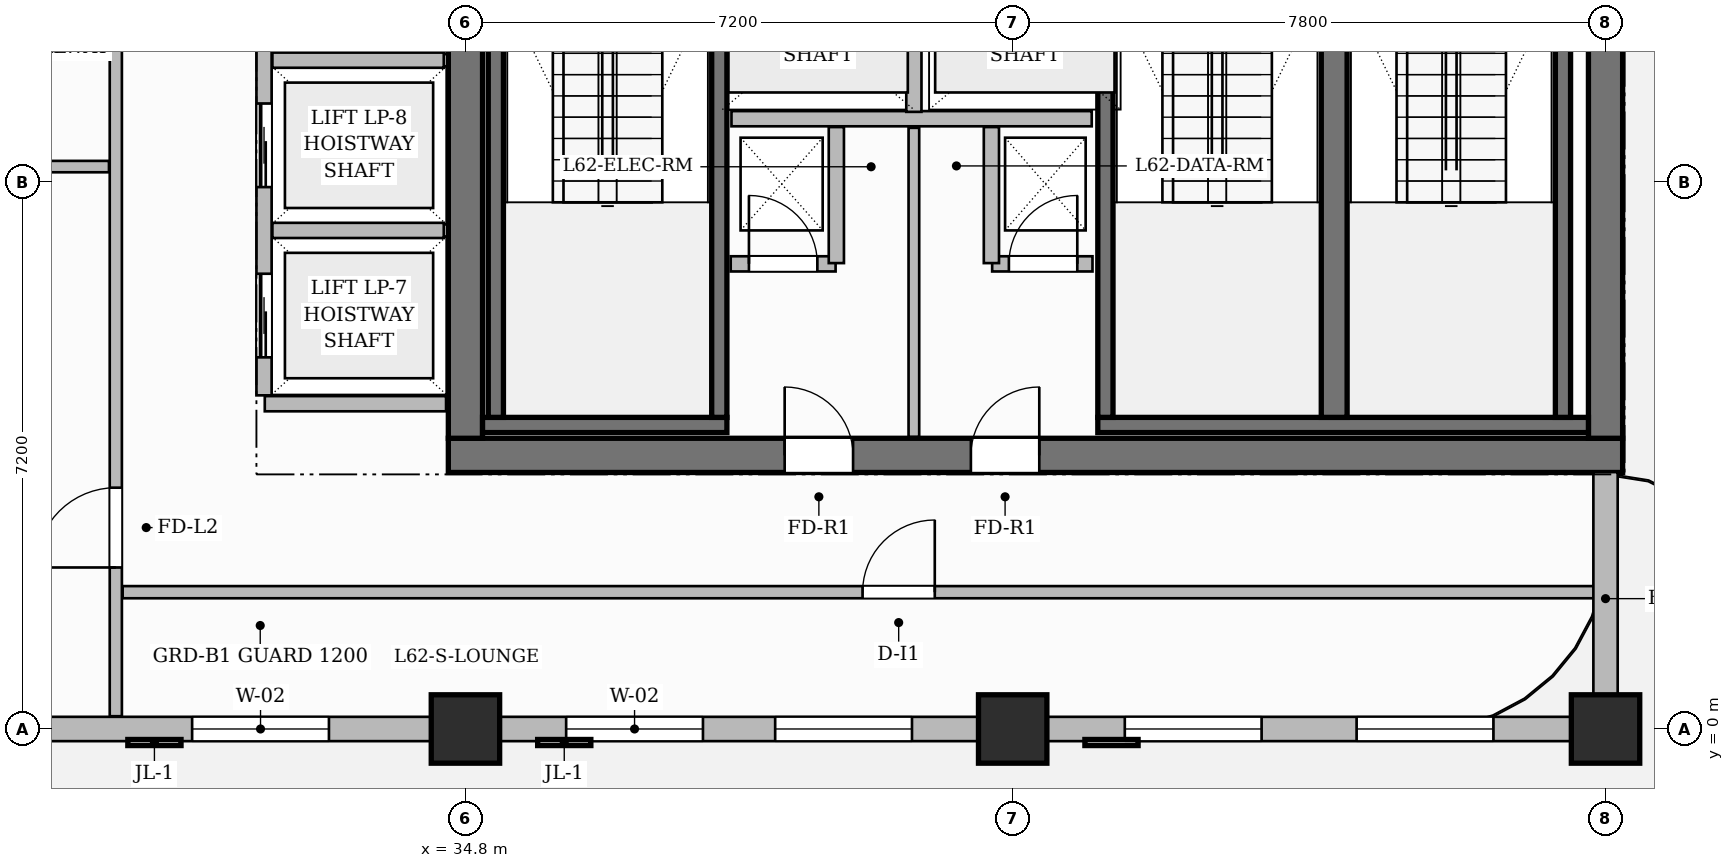
"""IFC4 building model, lengths in metres.
Left out: names, types, materials, properties, quantities, classifications, styles, units other than length and angle.
Written with IfcOpenShell. Run it as: python <this file> out.ifc"""

import sys

from ifc_helpers import new_model, si_unit, direction, frame, frame_2d, origin, origin_2d, place, context, subcontext, project, spatial, rectangle, extrude, source, transform, mapped, element, fill, save


model = new_model("IFC4")
c1 = context("Model", 3, precision=1e-05, world=origin(), true_north=direction((0.0, 1.0)))
c2 = subcontext(c1, "Body", "Model", "MODEL_VIEW")
j1 = project(units=[si_unit("LENGTHUNIT", "METRE"), si_unit("PLANEANGLEUNIT", "RADIAN")], contexts=[c1])
p1 = place(None, origin())
s1 = spatial("IfcSite", under=j1, at=p1, CompositionType="ELEMENT")
p2 = place(p1, origin())
s2 = spatial("IfcBuilding", under=s1, at=p2, CompositionType="ELEMENT")
p3 = place(p2, frame((0.0, 0.0, 248.1)))
s3 = spatial("IfcBuildingStorey", under=s2, at=p3, CompositionType="ELEMENT", Elevation=248.1)
p4 = place(p3, frame((34.575, 3.6, 0.0), z_axis=(0.0, 0.0, 1.0), x_axis=(1.0, 0.0, 0.0)))
e1 = element("IfcWall", 1, at=p4, inside=s3, PredefinedType="SHEAR", context=c2, shape_type="SweptSolid", body=[
    extrude(rectangle(XDim=15.45, YDim=0.45, at=frame_2d((7.725, 0.0))), origin(), (0.0, 0.0, 1.0), 3.85),
])
p5 = place(p4, frame((4.425, 0.0, 0.0)))
e2 = element("IfcOpeningElement", 2, at=p5, cuts=e1, PredefinedType="OPENING", context=c2, shape_type="SweptSolid", body=[
    extrude(rectangle(XDim=0.9, YDim=2.1, at=frame_2d((0.45, 1.05))), frame((0.0, 0.235, 0.0), z_axis=(0.0, -1.0, 0.0), x_axis=(1.0, 0.0, 0.0)), (0.0, 0.0, 1.0), 0.47),
])
p6 = place(p4, frame((6.875, 0.0, 0.0)))
e3 = element("IfcOpeningElement", 3, at=p6, cuts=e1, PredefinedType="OPENING", context=c2, shape_type="SweptSolid", body=[
    extrude(rectangle(XDim=0.9, YDim=2.1, at=frame_2d((0.45, 1.05))), frame((0.0, 0.235, 0.0), z_axis=(0.0, -1.0, 0.0), x_axis=(1.0, 0.0, 0.0)), (0.0, 0.0, 1.0), 0.47),
])
for number, where, z_axis, x_axis in (
    (4, (34.8, 3.825, 0.0), (0.0, 0.0, 1.0), (0.0, 1.0, 0.0)),
    (5, (49.8, 3.825, 0.0), (0.0, 0.0, 1.0), (0.0, 1.0, 0.0)),
):
    element("IfcWall", number, at=place(p3, frame(where, z_axis=z_axis, x_axis=x_axis)), inside=s3, PredefinedType="SHEAR", context=c2, shape_type="SweptSolid", body=[
        extrude(rectangle(XDim=10.35, YDim=0.45, at=frame_2d((5.175, 0.0))), origin(), (0.0, 0.0, 1.0), 3.85),
    ])
m1 = source(origin(), c2, "Body", "SweptSolid", [
    extrude(rectangle(XDim=0.9, YDim=0.9, at=origin_2d()), origin(), (0.0, 0.0, 1.0), 3.85),
])
for number, where, z_axis, x_axis in (
    (6, (34.8, 0.0, 0.0), (0.0, 0.0, 1.0), (1.0, 0.0, 0.0)),
    (7, (42.0, 0.0, 0.0), (0.0, 0.0, 1.0), (1.0, 0.0, 0.0)),
    (8, (49.8, 0.0, 0.0), (0.0, 0.0, 1.0), (1.0, 0.0, 0.0)),
):
    element("IfcColumn", number, at=place(p3, frame(where, z_axis=z_axis, x_axis=x_axis)), inside=s3, PredefinedType="COLUMN", context=c2, shape_type="MappedRepresentation", body=[
        mapped(m1, transform((0.0, 0.0, 0.0), scale=1.0)),
    ])
p7 = place(p3, frame((35.025, 4.0, 0.0), z_axis=(0.0, 0.0, 1.0), x_axis=(1.0, 0.0, 0.0)))
e9 = element("IfcWall", 9, at=p7, inside=s3, PredefinedType="SHEAR", context=c2, shape_type="SweptSolid", body=[
    extrude(rectangle(XDim=3.215, YDim=0.2, at=frame_2d((1.607, 0.0))), origin(), (0.0, 0.0, 1.0), 3.85),
])
for number, where, z_axis, x_axis in (
    (10, (35.2, 4.1, 0.0), (0.0, 0.0, 1.0), (0.0, 1.0, 0.0)),
    (11, (38.14, 4.1, 0.0), (0.0, 0.0, 1.0), (0.0, 1.0, 0.0)),
):
    element("IfcWall", number, at=place(p3, frame(where, z_axis=z_axis, x_axis=x_axis)), inside=s3, PredefinedType="SHEAR", context=c2, shape_type="SweptSolid", body=[
        extrude(rectangle(XDim=6.95, YDim=0.2, at=frame_2d((3.475, 0.0))), origin(), (0.0, 0.0, 1.0), 3.85),
    ])
p8 = place(p3, frame((43.12, 4.0, 0.0), z_axis=(0.0, 0.0, 1.0), x_axis=(1.0, 0.0, 0.0)))
e12 = element("IfcWall", 12, at=p8, inside=s3, PredefinedType="SHEAR", context=c2, shape_type="SweptSolid", body=[
    extrude(rectangle(XDim=6.455, YDim=0.2, at=frame_2d((3.228, 0.0))), origin(), (0.0, 0.0, 1.0), 3.85),
])
p9 = place(p3, frame((43.22, 4.1, 0.0), z_axis=(0.0, 0.0, 1.0), x_axis=(0.0, 1.0, 0.0)))
e13 = element("IfcWall", 13, at=p9, inside=s3, PredefinedType="SHEAR", context=c2, shape_type="SweptSolid", body=[
    extrude(rectangle(XDim=6.95, YDim=0.2, at=frame_2d((3.475, 0.0))), origin(), (0.0, 0.0, 1.0), 3.85),
])
p10 = place(p3, frame((46.23, 4.1, 0.0), z_axis=(0.0, 0.0, 1.0), x_axis=(0.0, 1.0, 0.0)))
e14 = element("IfcWall", 14, at=p10, inside=s3, PredefinedType="SHEAR", context=c2, shape_type="SweptSolid", body=[
    extrude(rectangle(XDim=6.95, YDim=0.34, at=frame_2d((3.475, 0.0))), origin(), (0.0, 0.0, 1.0), 3.85),
])
p11 = place(p3, frame((49.24, 4.1, 0.0), z_axis=(0.0, 0.0, 1.0), x_axis=(0.0, 1.0, 0.0)))
e15 = element("IfcWall", 15, at=p11, inside=s3, PredefinedType="SHEAR", context=c2, shape_type="SweptSolid", body=[
    extrude(rectangle(XDim=6.95, YDim=0.2, at=frame_2d((3.475, 0.0))), origin(), (0.0, 0.0, 1.0), 3.85),
])
p12 = place(p3, frame((38.3, 8.03, 0.0), z_axis=(0.0, 0.0, 1.0), x_axis=(1.0, 0.0, 0.0)))
e16 = element("IfcWall", 16, at=p12, inside=s3, PredefinedType="PARTITIONING", context=c2, shape_type="SweptSolid", body=[
    extrude(rectangle(XDim=4.74, YDim=0.2, at=frame_2d((2.37, 0.0))), origin(), (0.0, 0.0, 1.0), 3.6),
])
p13 = place(p3, frame((40.7, 8.12, 0.0), z_axis=(0.0, 0.0, 1.0), x_axis=(0.0, 1.0, 0.0)))
e17 = element("IfcWall", 17, at=p13, inside=s3, PredefinedType="PARTITIONING", context=c2, shape_type="SweptSolid", body=[
    extrude(rectangle(XDim=2.18, YDim=0.2, at=frame_2d((1.09, 0.0))), origin(), (0.0, 0.0, 1.0), 3.6),
])
p14 = place(p3, frame((38.29, 6.12, 0.0), z_axis=(0.0, 0.0, 1.0), x_axis=(1.0, 0.0, 0.0)))
e18 = element("IfcWall", 18, at=p14, inside=s3, PredefinedType="PARTITIONING", context=c2, shape_type="SweptSolid", body=[
    extrude(rectangle(XDim=1.38, YDim=0.2, at=frame_2d((0.69, 0.0))), origin(), (0.0, 0.0, 1.0), 3.6),
])
p15 = place(p14, frame((0.24, 0.0, 0.0)))
e19 = element("IfcOpeningElement", 19, at=p15, cuts=e18, PredefinedType="OPENING", context=c2, shape_type="SweptSolid", body=[
    extrude(rectangle(XDim=0.9, YDim=2.1, at=frame_2d((0.45, 1.05))), frame((0.0, 0.11, 0.0), z_axis=(0.0, -1.0, 0.0), x_axis=(1.0, 0.0, 0.0)), (0.0, 0.0, 1.0), 0.22),
])
p16 = place(p3, frame((39.68, 6.13, 0.0), z_axis=(0.0, 0.0, 1.0), x_axis=(0.0, 1.0, 0.0)))
e20 = element("IfcWall", 20, at=p16, inside=s3, PredefinedType="PARTITIONING", context=c2, shape_type="SweptSolid", body=[
    extrude(rectangle(XDim=1.79, YDim=0.2, at=frame_2d((0.895, 0.0))), origin(), (0.0, 0.0, 1.0), 3.6),
])
p17 = place(p3, frame((41.73, 6.12, 0.0), z_axis=(0.0, 0.0, 1.0), x_axis=(1.0, 0.0, 0.0)))
e21 = element("IfcWall", 21, at=p17, inside=s3, PredefinedType="PARTITIONING", context=c2, shape_type="SweptSolid", body=[
    extrude(rectangle(XDim=1.32, YDim=0.2, at=frame_2d((0.66, 0.0))), origin(), (0.0, 0.0, 1.0), 3.6),
])
p18 = place(p17, frame((0.22, 0.0, 0.0)))
e22 = element("IfcOpeningElement", 22, at=p18, cuts=e21, PredefinedType="OPENING", context=c2, shape_type="SweptSolid", body=[
    extrude(rectangle(XDim=0.9, YDim=2.1, at=frame_2d((0.45, 1.05))), frame((0.0, 0.11, 0.0), z_axis=(0.0, -1.0, 0.0), x_axis=(1.0, 0.0, 0.0)), (0.0, 0.0, 1.0), 0.22),
])
p19 = place(p3, frame((41.72, 6.13, 0.0), z_axis=(0.0, 0.0, 1.0), x_axis=(0.0, 1.0, 0.0)))
e23 = element("IfcWall", 23, at=p19, inside=s3, PredefinedType="PARTITIONING", context=c2, shape_type="SweptSolid", body=[
    extrude(rectangle(XDim=1.79, YDim=0.2, at=frame_2d((0.895, 0.0))), origin(), (0.0, 0.0, 1.0), 3.6),
])
p20 = place(p3, frame((40.7, 3.845, 0.0), z_axis=(0.0, 0.0, 1.0), x_axis=(0.0, 1.0, 0.0)))
e24 = element("IfcWall", 24, at=p20, inside=s3, PredefinedType="PARTITIONING", context=c2, shape_type="SweptSolid", body=[
    extrude(rectangle(XDim=4.065, YDim=0.14, at=frame_2d((2.032, 0.0))), origin(), (0.0, 0.0, 1.0), 3.6),
])
p21 = place(p3, frame((32.16, 4.28, 0.0), z_axis=(0.0, 0.0, 1.0), x_axis=(1.0, 0.0, 0.0)))
e25 = element("IfcWall", 25, at=p21, inside=s3, PredefinedType="PARTITIONING", context=c2, shape_type="SweptSolid", body=[
    extrude(rectangle(XDim=2.385, YDim=0.2, at=frame_2d((1.192, 0.0))), origin(), (0.0, 0.0, 1.0), 3.6),
])
p22 = place(p3, frame((32.15, 4.39, 0.0), z_axis=(0.0, 0.0, 1.0), x_axis=(0.0, 1.0, 0.0)))
e26 = element("IfcWall", 26, at=p22, inside=s3, PredefinedType="PARTITIONING", context=c2, shape_type="SweptSolid", body=[
    extrude(rectangle(XDim=8.82, YDim=0.2, at=frame_2d((4.41, 0.0))), origin(), (0.0, 0.0, 1.0), 3.6),
])
p23 = place(p22, frame((0.5, 0.0, 0.0)))
e27 = element("IfcOpeningElement", 27, at=p23, cuts=e26, PredefinedType="OPENING", context=c2, shape_type="SweptSolid", body=[
    extrude(rectangle(XDim=1.1, YDim=2.2, at=frame_2d((0.55, 1.1))), frame((0.0, 0.11, 0.0), z_axis=(0.0, -1.0, 0.0), x_axis=(1.0, 0.0, 0.0)), (0.0, 0.0, 1.0), 0.22),
])
p24 = place(p22, frame((2.74, 0.0, 0.0)))
e28 = element("IfcOpeningElement", 28, at=p24, cuts=e26, PredefinedType="OPENING", context=c2, shape_type="SweptSolid", body=[
    extrude(rectangle(XDim=1.1, YDim=2.2, at=frame_2d((0.55, 1.1))), frame((0.0, 0.11, 0.0), z_axis=(0.0, -1.0, 0.0), x_axis=(1.0, 0.0, 0.0)), (0.0, 0.0, 1.0), 0.22),
])
p25 = place(p22, frame((4.98, 0.0, 0.0)))
e29 = element("IfcOpeningElement", 29, at=p25, cuts=e26, PredefinedType="OPENING", context=c2, shape_type="SweptSolid", body=[
    extrude(rectangle(XDim=1.1, YDim=2.2, at=frame_2d((0.55, 1.1))), frame((0.0, 0.11, 0.0), z_axis=(0.0, -1.0, 0.0), x_axis=(1.0, 0.0, 0.0)), (0.0, 0.0, 1.0), 0.22),
])
p26 = place(p22, frame((7.22, 0.0, 0.0)))
e30 = element("IfcOpeningElement", 30, at=p26, cuts=e26, PredefinedType="OPENING", context=c2, shape_type="SweptSolid", body=[
    extrude(rectangle(XDim=1.1, YDim=2.2, at=frame_2d((0.55, 1.1))), frame((0.0, 0.11, 0.0), z_axis=(0.0, -1.0, 0.0), x_axis=(1.0, 0.0, 0.0)), (0.0, 0.0, 1.0), 0.22),
])
for number, where, z_axis, x_axis in (
    (31, (32.26, 6.56, 0.0), (0.0, 0.0, 1.0), (1.0, 0.0, 0.0)),
    (32, (32.26, 8.8, 0.0), (0.0, 0.0, 1.0), (1.0, 0.0, 0.0)),
):
    element("IfcWall", number, at=place(p3, frame(where, z_axis=z_axis, x_axis=x_axis)), inside=s3, PredefinedType="PARTITIONING", context=c2, shape_type="SweptSolid", body=[
        extrude(rectangle(XDim=2.255, YDim=0.2, at=frame_2d((1.127, 0.0))), origin(), (0.0, 0.0, 1.0), 3.6),
    ])
p27 = place(p3, frame((30.2, 0.168, 0.0), z_axis=(0.0, 0.0, 1.0), x_axis=(0.0, 1.0, 0.0)))
e33 = element("IfcWall", 33, at=p27, inside=s3, PredefinedType="PARTITIONING", context=c2, shape_type="SweptSolid", body=[
    extrude(rectangle(XDim=9.292, YDim=0.16, at=frame_2d((4.646, 0.0))), origin(), (0.0, 0.0, 1.0), 3.6),
])
p28 = place(p27, frame((1.957, 0.0, 0.0)))
e34 = element("IfcOpeningElement", 34, at=p28, cuts=e33, PredefinedType="OPENING", context=c2, shape_type="SweptSolid", body=[
    extrude(rectangle(XDim=1.05, YDim=2.15, at=frame_2d((0.525, 1.075))), frame((0.0, 0.09, 0.0), z_axis=(0.0, -1.0, 0.0), x_axis=(1.0, 0.0, 0.0)), (0.0, 0.0, 1.0), 0.18),
])
p29 = place(p3, frame((30.29, 1.8, 0.0), z_axis=(0.0, 0.0, 1.0), x_axis=(1.0, 0.0, 0.0)))
e35 = element("IfcWall", 35, at=p29, inside=s3, PredefinedType="PARTITIONING", context=c2, shape_type="SweptSolid", body=[
    extrude(rectangle(XDim=19.37, YDim=0.16, at=frame_2d((9.685, 0.0))), origin(), (0.0, 0.0, 1.0), 3.6),
])
p30 = place(p29, frame((9.735, 0.0, 0.0)))
e36 = element("IfcOpeningElement", 36, at=p30, cuts=e35, PredefinedType="OPENING", context=c2, shape_type="SweptSolid", body=[
    extrude(rectangle(XDim=0.95, YDim=2.15, at=frame_2d((0.475, 1.075))), frame((0.0, 0.09, 0.0), z_axis=(0.0, -1.0, 0.0), x_axis=(1.0, 0.0, 0.0)), (0.0, 0.0, 1.0), 0.18),
])
p31 = place(p3, frame((24.89, 7.4, 0.0), z_axis=(0.0, 0.0, 1.0), x_axis=(1.0, 0.0, 0.0)))
e37 = element("IfcWall", 37, at=p31, inside=s3, PredefinedType="PARTITIONING", context=c2, shape_type="SweptSolid", body=[
    extrude(rectangle(XDim=5.22, YDim=0.15, at=frame_2d((2.61, 0.0))), origin(), (0.0, 0.0, 1.0), 3.135),
])
p32 = place(p31, frame((1.11, 0.0, 0.0)))
e38 = element("IfcOpeningElement", 38, at=p32, cuts=e37, PredefinedType="OPENING", context=c2, shape_type="SweptSolid", body=[
    extrude(rectangle(XDim=0.9, YDim=2.15, at=frame_2d((0.45, 1.075))), frame((0.0, 0.085, 0.0), z_axis=(0.0, -1.0, 0.0), x_axis=(1.0, 0.0, 0.0)), (0.0, 0.0, 1.0), 0.17),
])
p33 = place(p3, frame((14.4, 0.0, 0.0), z_axis=(0.0, 0.0, 1.0), x_axis=(1.0, 0.0, 0.0)))
e39 = element("IfcWall", 39, at=p33, inside=s3, PredefinedType="SOLIDWALL", context=c2, shape_type="SweptSolid", body=[
    extrude(rectangle(XDim=35.4, YDim=0.32, at=frame_2d((17.7, 0.0))), origin(), (0.0, 0.0, 1.0), 3.135),
])
p34 = place(p33, frame((0.85, 0.0, 0.0)))
e40 = element("IfcOpeningElement", 40, at=p34, cuts=e39, PredefinedType="OPENING", context=c2, shape_type="SweptSolid", body=[
    extrude(rectangle(XDim=1.2, YDim=2.2, at=frame_2d((0.6, 1.1))), frame((0.0, 0.17, 0.0), z_axis=(0.0, -1.0, 0.0), x_axis=(1.0, 0.0, 0.0)), (0.0, 0.0, 1.0), 0.34),
])
p35 = place(p33, frame((2.811, 0.0, 0.8)))
e41 = element("IfcOpeningElement", 41, at=p35, cuts=e39, PredefinedType="OPENING", context=c2, shape_type="SweptSolid", body=[
    extrude(rectangle(XDim=1.8, YDim=1.85, at=frame_2d((0.9, 0.925))), frame((0.0, 0.17, 0.0), z_axis=(0.0, -1.0, 0.0), x_axis=(1.0, 0.0, 0.0)), (0.0, 0.0, 1.0), 0.34),
])
p36 = place(p33, frame((5.269, 0.0, 0.8)))
e42 = element("IfcOpeningElement", 42, at=p36, cuts=e39, PredefinedType="OPENING", context=c2, shape_type="SweptSolid", body=[
    extrude(rectangle(XDim=0.95, YDim=1.75, at=frame_2d((0.475, 0.875))), frame((0.0, 0.17, 0.0), z_axis=(0.0, -1.0, 0.0), x_axis=(1.0, 0.0, 0.0)), (0.0, 0.0, 1.0), 0.34),
])
p37 = place(p33, frame((8.496, 0.0, 0.8)))
e43 = element("IfcOpeningElement", 43, at=p37, cuts=e39, PredefinedType="OPENING", context=c2, shape_type="SweptSolid", body=[
    extrude(rectangle(XDim=1.4, YDim=1.85, at=frame_2d((0.7, 0.925))), frame((0.0, 0.17, 0.0), z_axis=(0.0, -1.0, 0.0), x_axis=(1.0, 0.0, 0.0)), (0.0, 0.0, 1.0), 0.34),
])
p38 = place(p33, frame((11.104, 0.0, 0.8)))
e44 = element("IfcOpeningElement", 44, at=p38, cuts=e39, PredefinedType="OPENING", context=c2, shape_type="SweptSolid", body=[
    extrude(rectangle(XDim=1.8, YDim=1.85, at=frame_2d((0.9, 0.925))), frame((0.0, 0.17, 0.0), z_axis=(0.0, -1.0, 0.0), x_axis=(1.0, 0.0, 0.0)), (0.0, 0.0, 1.0), 0.34),
])
p39 = place(p33, frame((16.804, 0.0, 0.8)))
e45 = element("IfcOpeningElement", 45, at=p39, cuts=e39, PredefinedType="OPENING", context=c2, shape_type="SweptSolid", body=[
    extrude(rectangle(XDim=1.8, YDim=1.85, at=frame_2d((0.9, 0.925))), frame((0.0, 0.17, 0.0), z_axis=(0.0, -1.0, 0.0), x_axis=(1.0, 0.0, 0.0)), (0.0, 0.0, 1.0), 0.34),
])
p40 = place(p33, frame((21.725, 0.0, 0.8)))
e46 = element("IfcOpeningElement", 46, at=p40, cuts=e39, PredefinedType="OPENING", context=c2, shape_type="SweptSolid", body=[
    extrude(rectangle(XDim=1.8, YDim=1.85, at=frame_2d((0.9, 0.925))), frame((0.0, 0.17, 0.0), z_axis=(0.0, -1.0, 0.0), x_axis=(1.0, 0.0, 0.0)), (0.0, 0.0, 1.0), 0.34),
])
p41 = place(p33, frame((24.475, 0.0, 0.8)))
e47 = element("IfcOpeningElement", 47, at=p41, cuts=e39, PredefinedType="OPENING", context=c2, shape_type="SweptSolid", body=[
    extrude(rectangle(XDim=1.8, YDim=1.85, at=frame_2d((0.9, 0.925))), frame((0.0, 0.17, 0.0), z_axis=(0.0, -1.0, 0.0), x_axis=(1.0, 0.0, 0.0)), (0.0, 0.0, 1.0), 0.34),
])
p42 = place(p33, frame((29.075, 0.0, 0.8)))
e48 = element("IfcOpeningElement", 48, at=p42, cuts=e39, PredefinedType="OPENING", context=c2, shape_type="SweptSolid", body=[
    extrude(rectangle(XDim=1.8, YDim=1.85, at=frame_2d((0.9, 0.925))), frame((0.0, 0.17, 0.0), z_axis=(0.0, -1.0, 0.0), x_axis=(1.0, 0.0, 0.0)), (0.0, 0.0, 1.0), 0.34),
])
p43 = place(p33, frame((32.125, 0.0, 0.8)))
e49 = element("IfcOpeningElement", 49, at=p43, cuts=e39, PredefinedType="OPENING", context=c2, shape_type="SweptSolid", body=[
    extrude(rectangle(XDim=1.8, YDim=1.85, at=frame_2d((0.9, 0.925))), frame((0.0, 0.17, 0.0), z_axis=(0.0, -1.0, 0.0), x_axis=(1.0, 0.0, 0.0)), (0.0, 0.0, 1.0), 0.34),
])
p44 = place(p3, frame((49.8, 0.05, 0.0), z_axis=(0.0, 0.0, 1.0), x_axis=(0.0, 1.0, 0.0)))
e50 = element("IfcWall", 50, at=p44, inside=s3, PredefinedType="SOLIDWALL", context=c2, shape_type="SweptSolid", body=[
    extrude(rectangle(XDim=3.33, YDim=0.32, at=frame_2d((1.665, 0.0))), origin(), (0.0, 0.0, 1.0), 3.6),
])
m2 = source(origin(), c2, "Body", "SweptSolid", [
    extrude(rectangle(XDim=0.9, YDim=2.1, at=frame_2d((0.45, 1.05))), frame((0.0, 0.025, 0.0), z_axis=(0.0, -1.0, 0.0), x_axis=(1.0, 0.0, 0.0)), (0.0, 0.0, 1.0), 0.05),
])
p45 = place(p15, origin())
e51 = element("IfcDoor", 51, at=p45, inside=s3, OperationType="SINGLE_SWING_LEFT", PredefinedType="DOOR", context=c2, shape_type="MappedRepresentation", body=[
    mapped(m2, transform((0.0, 0.0, 0.0), scale=1.0)),
])
fill(e19, e51)
p46 = place(p18, origin())
e52 = element("IfcDoor", 52, at=p46, inside=s3, OperationType="SINGLE_SWING_RIGHT", PredefinedType="DOOR", context=c2, shape_type="MappedRepresentation", body=[
    mapped(m2, transform((0.0, 0.0, 0.0), scale=1.0)),
])
fill(e22, e52)
p47 = place(p5, origin())
e53 = element("IfcDoor", 53, at=p47, inside=s3, OperationType="SINGLE_SWING_LEFT", PredefinedType="DOOR", context=c2, shape_type="MappedRepresentation", body=[
    mapped(m2, transform((0.0, 0.0, 0.0), scale=1.0)),
])
fill(e2, e53)
p48 = place(p6, origin())
e54 = element("IfcDoor", 54, at=p48, inside=s3, OperationType="SINGLE_SWING_RIGHT", PredefinedType="DOOR", context=c2, shape_type="MappedRepresentation", body=[
    mapped(m2, transform((0.0, 0.0, 0.0), scale=1.0)),
])
fill(e3, e54)
m3 = source(origin(), c2, "Body", "SweptSolid", [
    extrude(rectangle(XDim=1.05, YDim=2.15, at=frame_2d((0.525, 1.075))), frame((0.0, 0.025, 0.0), z_axis=(0.0, -1.0, 0.0), x_axis=(1.0, 0.0, 0.0)), (0.0, 0.0, 1.0), 0.05),
])
p49 = place(p28, origin())
e55 = element("IfcDoor", 55, at=p49, inside=s3, OperationType="SINGLE_SWING_LEFT", PredefinedType="DOOR", context=c2, shape_type="MappedRepresentation", body=[
    mapped(m3, transform((0.0, 0.0, 0.0), scale=1.0)),
])
fill(e34, e55)
m4 = source(origin(), c2, "Body", "SweptSolid", [
    extrude(rectangle(XDim=0.95, YDim=2.15, at=frame_2d((0.475, 1.075))), frame((0.0, 0.025, 0.0), z_axis=(0.0, -1.0, 0.0), x_axis=(1.0, 0.0, 0.0)), (0.0, 0.0, 1.0), 0.05),
])
p50 = place(p30, origin())
e56 = element("IfcDoor", 56, at=p50, inside=s3, OperationType="SINGLE_SWING_RIGHT", PredefinedType="DOOR", context=c2, shape_type="MappedRepresentation", body=[
    mapped(m4, transform((0.0, 0.0, 0.0), scale=1.0)),
])
fill(e36, e56)
m5 = source(origin(), c2, "Body", "SweptSolid", [
    extrude(rectangle(XDim=1.1, YDim=2.2, at=frame_2d((0.55, 1.1))), frame((0.0, 0.025, 0.0), z_axis=(0.0, -1.0, 0.0), x_axis=(1.0, 0.0, 0.0)), (0.0, 0.0, 1.0), 0.05),
])
p51 = place(p23, origin())
e57 = element("IfcDoor", 57, at=p51, inside=s3, OperationType="SLIDING_TO_LEFT", PredefinedType="DOOR", context=c2, shape_type="MappedRepresentation", body=[
    mapped(m5, transform((0.0, 0.0, 0.0), scale=1.0)),
])
fill(e27, e57)
p52 = place(p24, origin())
e58 = element("IfcDoor", 58, at=p52, inside=s3, OperationType="SLIDING_TO_LEFT", PredefinedType="DOOR", context=c2, shape_type="MappedRepresentation", body=[
    mapped(m5, transform((0.0, 0.0, 0.0), scale=1.0)),
])
fill(e28, e58)
m6 = source(origin(), c2, "Body", "SweptSolid", [
    extrude(rectangle(XDim=1.8, YDim=1.85, at=frame_2d((0.9, 0.925))), frame((0.0, 0.03, 0.0), z_axis=(0.0, -1.0, 0.0), x_axis=(1.0, 0.0, 0.0)), (0.0, 0.0, 1.0), 0.06),
])
p53 = place(p39, origin())
e59 = element("IfcWindow", 59, at=p53, inside=s3, PartitioningType="DOUBLE_PANEL_VERTICAL", PredefinedType="WINDOW", context=c2, shape_type="MappedRepresentation", body=[
    mapped(m6, transform((0.0, 0.0, 0.0), scale=1.0)),
])
fill(e45, e59)
p54 = place(p40, origin())
e60 = element("IfcWindow", 60, at=p54, inside=s3, PartitioningType="DOUBLE_PANEL_VERTICAL", PredefinedType="WINDOW", context=c2, shape_type="MappedRepresentation", body=[
    mapped(m6, transform((0.0, 0.0, 0.0), scale=1.0)),
])
fill(e46, e60)
p55 = place(p41, origin())
e61 = element("IfcWindow", 61, at=p55, inside=s3, PartitioningType="DOUBLE_PANEL_VERTICAL", PredefinedType="WINDOW", context=c2, shape_type="MappedRepresentation", body=[
    mapped(m6, transform((0.0, 0.0, 0.0), scale=1.0)),
])
fill(e47, e61)
p56 = place(p42, origin())
e62 = element("IfcWindow", 62, at=p56, inside=s3, PartitioningType="DOUBLE_PANEL_VERTICAL", PredefinedType="WINDOW", context=c2, shape_type="MappedRepresentation", body=[
    mapped(m6, transform((0.0, 0.0, 0.0), scale=1.0)),
])
fill(e48, e62)
p57 = place(p43, origin())
e63 = element("IfcWindow", 63, at=p57, inside=s3, PartitioningType="DOUBLE_PANEL_VERTICAL", PredefinedType="WINDOW", context=c2, shape_type="MappedRepresentation", body=[
    mapped(m6, transform((0.0, 0.0, 0.0), scale=1.0)),
])
fill(e49, e63)
save(model, sys.argv[1])
